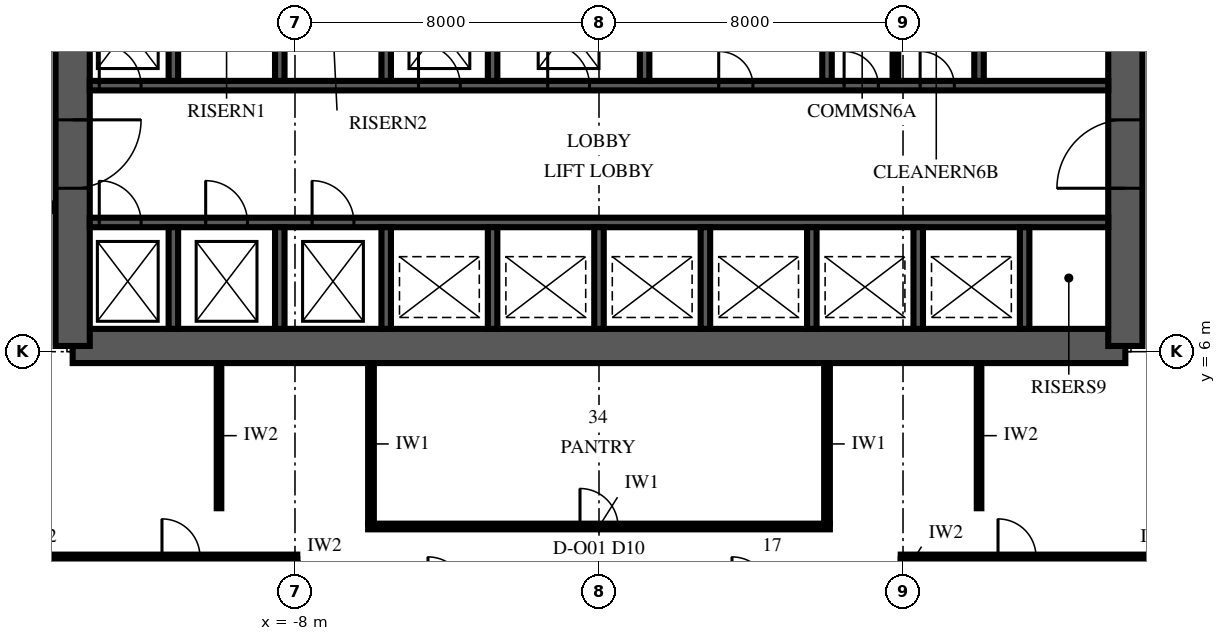
"""IFC4 building model, lengths in metres.
Left out: names, types, materials, properties, quantities, classifications, styles, units other than length and angle.
Written with IfcOpenShell. Run it as: python <this file> out.ifc"""

import sys

from ifc_helpers import new_model, si_unit, direction, frame, frame_2d, origin, place, context, subcontext, project, spatial, polyline, rectangle, outline, extrude, element, fill, save


model = new_model("IFC4")
c1 = context("Model", 3, precision=1e-05, world=origin(), true_north=direction((0.0, 1.0)))
c2 = subcontext(c1, "Body", "Model", "MODEL_VIEW")
j1 = project(units=[si_unit("LENGTHUNIT", "METRE"), si_unit("PLANEANGLEUNIT", "RADIAN")], contexts=[c1])
p1 = place(None, origin())
s1 = spatial("IfcSite", under=j1, at=p1, CompositionType="ELEMENT")
p2 = place(p1, origin())
s2 = spatial("IfcBuilding", under=s1, at=p2, CompositionType="ELEMENT")
p3 = place(p2, frame((0.0, 0.0, 72.0)))
s3 = spatial("IfcBuildingStorey", under=s2, at=p3, CompositionType="ELEMENT", Elevation=72.0)
p4 = place(p3, frame((-13.85, 6.15, 0.0), z_axis=(0.0, 0.0, 1.0), x_axis=(1.0, 0.0, 0.0)))
e1 = element("IfcWall", 1, at=p4, inside=s3, PredefinedType="SHEAR", context=c2, shape_type="SweptSolid", body=[
    extrude(rectangle(XDim=27.7, YDim=0.9, at=frame_2d((13.85, 0.0))), origin(), (0.0, 0.0, 1.0), 4.0),
])
p5 = place(p3, frame((13.85, 6.15, 0.0), z_axis=(0.0, 0.0, 1.0), x_axis=(0.0, 1.0, 0.0)))
e2 = element("IfcWall", 2, at=p5, inside=s3, PredefinedType="SHEAR", context=c2, shape_type="SweptSolid", body=[
    extrude(outline(polyline([(0.0, -0.45), (17.7, -0.45), (17.7, 0.0), (17.25, 0.0), (17.25, 0.45), (0.45, 0.45), (0.45, 0.0), (0.0, 0.0), (0.0, -0.45)])), origin(), (0.0, 0.0, 1.0), 4.0),
])
p6 = place(p5, frame((4.15, 0.0, 0.0)))
e3 = element("IfcOpeningElement", 3, at=p6, cuts=e2, PredefinedType="OPENING", context=c2, shape_type="SweptSolid", body=[
    extrude(rectangle(XDim=1.8, YDim=2.4, at=frame_2d((0.9, 1.2))), frame((0.0, 0.465, 0.0), z_axis=(0.0, -1.0, 0.0), x_axis=(1.0, 0.0, 0.0)), (0.0, 0.0, 1.0), 0.93),
])
p7 = place(p3, frame((-13.85, 23.85, 0.0), z_axis=(0.0, 0.0, 1.0), x_axis=(0.0, -1.0, 0.0)))
e4 = element("IfcWall", 4, at=p7, inside=s3, PredefinedType="SHEAR", context=c2, shape_type="SweptSolid", body=[
    extrude(outline(polyline([(0.0, -0.45), (17.7, -0.45), (17.7, 0.0), (17.25, 0.0), (17.25, 0.45), (0.45, 0.45), (0.45, 0.0), (0.0, 0.0), (0.0, -0.45)])), origin(), (0.0, 0.0, 1.0), 4.0),
])
p8 = place(p7, frame((11.75, 0.0, 0.0)))
e5 = element("IfcOpeningElement", 5, at=p8, cuts=e4, PredefinedType="OPENING", context=c2, shape_type="SweptSolid", body=[
    extrude(rectangle(XDim=1.8, YDim=2.4, at=frame_2d((0.9, 1.2))), frame((0.0, 0.465, 0.0), z_axis=(0.0, -1.0, 0.0), x_axis=(1.0, 0.0, 0.0)), (0.0, 0.0, 1.0), 0.93),
])
p9 = place(p3, frame((-13.4, 9.4, 0.0), z_axis=(0.0, 0.0, 1.0), x_axis=(1.0, 0.0, 0.0)))
e6 = element("IfcWall", 6, at=p9, inside=s3, PredefinedType="SHEAR", context=c2, shape_type="SweptSolid", body=[
    extrude(rectangle(XDim=26.8, YDim=0.25, at=frame_2d((13.4, 0.0))), origin(), (0.0, 0.0, 1.0), 4.0),
])
p10 = place(p9, frame((0.25, 0.0, 0.0)))
e7 = element("IfcOpeningElement", 7, at=p10, cuts=e6, PredefinedType="OPENING", context=c2, shape_type="SweptSolid", body=[
    extrude(rectangle(XDim=1.1, YDim=2.1, at=frame_2d((0.55, 1.05))), frame((0.0, 0.14, 0.0), z_axis=(0.0, -1.0, 0.0), x_axis=(1.0, 0.0, 0.0)), (0.0, 0.0, 1.0), 0.28),
])
p11 = place(p9, frame((3.05, 0.0, 0.0)))
e8 = element("IfcOpeningElement", 8, at=p11, cuts=e6, PredefinedType="OPENING", context=c2, shape_type="SweptSolid", body=[
    extrude(rectangle(XDim=1.1, YDim=2.1, at=frame_2d((0.55, 1.05))), frame((0.0, 0.14, 0.0), z_axis=(0.0, -1.0, 0.0), x_axis=(1.0, 0.0, 0.0)), (0.0, 0.0, 1.0), 0.28),
])
p12 = place(p9, frame((5.85, 0.0, 0.0)))
e9 = element("IfcOpeningElement", 9, at=p12, cuts=e6, PredefinedType="OPENING", context=c2, shape_type="SweptSolid", body=[
    extrude(rectangle(XDim=1.1, YDim=2.1, at=frame_2d((0.55, 1.05))), frame((0.0, 0.14, 0.0), z_axis=(0.0, -1.0, 0.0), x_axis=(1.0, 0.0, 0.0)), (0.0, 0.0, 1.0), 0.28),
])
p13 = place(p3, frame((-13.4, 13.0, 0.0), z_axis=(0.0, 0.0, 1.0), x_axis=(1.0, 0.0, 0.0)))
e10 = element("IfcWall", 10, at=p13, inside=s3, PredefinedType="SHEAR", context=c2, shape_type="SweptSolid", body=[
    extrude(rectangle(XDim=26.8, YDim=0.25, at=frame_2d((13.4, 0.0))), origin(), (0.0, 0.0, 1.0), 4.0),
])
p14 = place(p13, frame((0.25, 0.0, 0.0)))
e11 = element("IfcOpeningElement", 11, at=p14, cuts=e10, PredefinedType="OPENING", context=c2, shape_type="SweptSolid", body=[
    extrude(rectangle(XDim=1.1, YDim=2.1, at=frame_2d((0.55, 1.05))), frame((0.0, 0.14, 0.0), z_axis=(0.0, -1.0, 0.0), x_axis=(1.0, 0.0, 0.0)), (0.0, 0.0, 1.0), 0.28),
])
p15 = place(p13, frame((8.65, 0.0, 0.0)))
e12 = element("IfcOpeningElement", 12, at=p15, cuts=e10, PredefinedType="OPENING", context=c2, shape_type="SweptSolid", body=[
    extrude(rectangle(XDim=1.1, YDim=2.1, at=frame_2d((0.55, 1.05))), frame((0.0, 0.14, 0.0), z_axis=(0.0, -1.0, 0.0), x_axis=(1.0, 0.0, 0.0)), (0.0, 0.0, 1.0), 0.28),
])
p16 = place(p13, frame((12.05, 0.0, 0.0)))
e13 = element("IfcOpeningElement", 13, at=p16, cuts=e10, PredefinedType="OPENING", context=c2, shape_type="SweptSolid", body=[
    extrude(rectangle(XDim=1.1, YDim=2.1, at=frame_2d((0.55, 1.05))), frame((0.0, 0.14, 0.0), z_axis=(0.0, -1.0, 0.0), x_axis=(1.0, 0.0, 0.0)), (0.0, 0.0, 1.0), 0.28),
])
p17 = place(p13, frame((16.55, 0.0, 0.0)))
e14 = element("IfcOpeningElement", 14, at=p17, cuts=e10, PredefinedType="OPENING", context=c2, shape_type="SweptSolid", body=[
    extrude(rectangle(XDim=0.9, YDim=2.1, at=frame_2d((0.45, 1.05))), frame((0.0, 0.14, 0.0), z_axis=(0.0, -1.0, 0.0), x_axis=(1.0, 0.0, 0.0)), (0.0, 0.0, 1.0), 0.28),
])
p18 = place(p13, frame((19.85, 0.0, 0.0)))
e15 = element("IfcOpeningElement", 15, at=p18, cuts=e10, PredefinedType="OPENING", context=c2, shape_type="SweptSolid", body=[
    extrude(rectangle(XDim=0.9, YDim=2.1, at=frame_2d((0.45, 1.05))), frame((0.0, 0.14, 0.0), z_axis=(0.0, -1.0, 0.0), x_axis=(1.0, 0.0, 0.0)), (0.0, 0.0, 1.0), 0.28),
])
p19 = place(p13, frame((21.85, 0.0, 0.0)))
e16 = element("IfcOpeningElement", 16, at=p19, cuts=e10, PredefinedType="OPENING", context=c2, shape_type="SweptSolid", body=[
    extrude(rectangle(XDim=0.9, YDim=2.1, at=frame_2d((0.45, 1.05))), frame((0.0, 0.14, 0.0), z_axis=(0.0, -1.0, 0.0), x_axis=(1.0, 0.0, 0.0)), (0.0, 0.0, 1.0), 0.28),
])
for number, where, z_axis, x_axis in (
    (17, (-11.2, 6.6, 0.0), (0.0, 0.0, 1.0), (0.0, 1.0, 0.0)),
    (18, (-8.4, 6.6, 0.0), (0.0, 0.0, 1.0), (0.0, 1.0, 0.0)),
    (19, (-5.6, 6.6, 0.0), (0.0, 0.0, 1.0), (0.0, 1.0, 0.0)),
    (20, (-2.8, 6.6, 0.0), (0.0, 0.0, 1.0), (0.0, 1.0, 0.0)),
    (21, (0.0, 6.6, 0.0), (0.0, 0.0, 1.0), (0.0, 1.0, 0.0)),
    (22, (2.8, 6.6, 0.0), (0.0, 0.0, 1.0), (0.0, 1.0, 0.0)),
    (23, (5.6, 6.6, 0.0), (0.0, 0.0, 1.0), (0.0, 1.0, 0.0)),
    (24, (8.4, 6.6, 0.0), (0.0, 0.0, 1.0), (0.0, 1.0, 0.0)),
    (25, (11.2, 6.6, 0.0), (0.0, 0.0, 1.0), (0.0, 1.0, 0.0)),
):
    element("IfcWall", number, at=place(p3, frame(where, z_axis=z_axis, x_axis=x_axis)), inside=s3, PredefinedType="SHEAR", context=c2, shape_type="SweptSolid", body=[
        extrude(rectangle(XDim=2.675, YDim=0.25, at=frame_2d((1.337, 0.0))), origin(), (0.0, 0.0, 1.0), 4.0),
    ])
for number, where, z_axis, x_axis in (
    (26, (-11.2, 13.125, 0.0), (0.0, 0.0, 1.0), (0.0, 1.0, 0.0)),
    (27, (-8.4, 13.125, 0.0), (0.0, 0.0, 1.0), (0.0, 1.0, 0.0)),
    (28, (-5.6, 13.125, 0.0), (0.0, 0.0, 1.0), (0.0, 1.0, 0.0)),
    (29, (-2.8, 13.125, 0.0), (0.0, 0.0, 1.0), (0.0, 1.0, 0.0)),
    (30, (1.2, 13.125, 0.0), (0.0, 0.0, 1.0), (0.0, 1.0, 0.0)),
    (31, (6.0, 13.125, 0.0), (0.0, 0.0, 1.0), (0.0, 1.0, 0.0)),
    (32, (10.0, 13.125, 0.0), (0.0, 0.0, 1.0), (0.0, 1.0, 0.0)),
):
    element("IfcWall", number, at=place(p3, frame(where, z_axis=z_axis, x_axis=x_axis)), inside=s3, PredefinedType="SHEAR", context=c2, shape_type="SweptSolid", body=[
        extrude(rectangle(XDim=2.75, YDim=0.25, at=frame_2d((1.375, 0.0))), origin(), (0.0, 0.0, 1.0), 4.0),
    ])
p20 = place(p3, frame((7.8, 13.125, 0.0), z_axis=(0.0, 0.0, 1.0), x_axis=(0.0, 1.0, 0.0)))
e33 = element("IfcWall", 33, at=p20, inside=s3, PredefinedType="PARTITIONING", context=c2, shape_type="SweptSolid", body=[
    extrude(rectangle(XDim=2.75, YDim=0.15, at=frame_2d((1.375, 0.0))), origin(), (0.0, 0.0, 1.0), 3.85),
])
p21 = place(p3, frame((-22.06, 0.6, 0.0), z_axis=(0.0, 0.0, 1.0), x_axis=(1.0, 0.0, 0.0)))
e34 = element("IfcWall", 34, at=p21, inside=s3, PredefinedType="PARTITIONING", context=c2, shape_type="SweptSolid", body=[
    extrude(rectangle(XDim=14.12, YDim=0.12, at=frame_2d((7.06, 0.0))), origin(), (0.0, 0.0, 1.0), 3.25),
])
p22 = place(p21, frame((1.56, 0.0, 0.0)))
e35 = element("IfcOpeningElement", 35, at=p22, cuts=e34, PredefinedType="OPENING", context=c2, shape_type="SweptSolid", body=[
    extrude(rectangle(XDim=1.0, YDim=2.4, at=frame_2d((0.5, 1.2))), frame((0.0, 0.075, 0.0), z_axis=(0.0, -1.0, 0.0), x_axis=(1.0, 0.0, 0.0)), (0.0, 0.0, 1.0), 0.15),
])
p23 = place(p21, frame((5.56, 0.0, 0.0)))
e36 = element("IfcOpeningElement", 36, at=p23, cuts=e34, PredefinedType="OPENING", context=c2, shape_type="SweptSolid", body=[
    extrude(rectangle(XDim=1.0, YDim=2.4, at=frame_2d((0.5, 1.2))), frame((0.0, 0.075, 0.0), z_axis=(0.0, -1.0, 0.0), x_axis=(1.0, 0.0, 0.0)), (0.0, 0.0, 1.0), 0.15),
])
p24 = place(p21, frame((10.56, 0.0, 0.0)))
e37 = element("IfcOpeningElement", 37, at=p24, cuts=e34, PredefinedType="OPENING", context=c2, shape_type="SweptSolid", body=[
    extrude(rectangle(XDim=1.0, YDim=2.4, at=frame_2d((0.5, 1.2))), frame((0.0, 0.075, 0.0), z_axis=(0.0, -1.0, 0.0), x_axis=(1.0, 0.0, 0.0)), (0.0, 0.0, 1.0), 0.15),
])
p25 = place(p3, frame((7.94, 0.6, 0.0), z_axis=(0.0, 0.0, 1.0), x_axis=(1.0, 0.0, 0.0)))
e38 = element("IfcWall", 38, at=p25, inside=s3, PredefinedType="PARTITIONING", context=c2, shape_type="SweptSolid", body=[
    extrude(rectangle(XDim=14.12, YDim=0.12, at=frame_2d((7.06, 0.0))), origin(), (0.0, 0.0, 1.0), 3.25),
])
p26 = place(p25, frame((7.56, 0.0, 0.0)))
e39 = element("IfcOpeningElement", 39, at=p26, cuts=e38, PredefinedType="OPENING", context=c2, shape_type="SweptSolid", body=[
    extrude(rectangle(XDim=1.0, YDim=2.4, at=frame_2d((0.5, 1.2))), frame((0.0, 0.075, 0.0), z_axis=(0.0, -1.0, 0.0), x_axis=(1.0, 0.0, 0.0)), (0.0, 0.0, 1.0), 0.15),
])
p27 = place(p25, frame((11.56, 0.0, 0.0)))
e40 = element("IfcOpeningElement", 40, at=p27, cuts=e38, PredefinedType="OPENING", context=c2, shape_type="SweptSolid", body=[
    extrude(rectangle(XDim=1.0, YDim=2.4, at=frame_2d((0.5, 1.2))), frame((0.0, 0.075, 0.0), z_axis=(0.0, -1.0, 0.0), x_axis=(1.0, 0.0, 0.0)), (0.0, 0.0, 1.0), 0.15),
])
p28 = place(p25, frame((2.56, 0.0, 0.0)))
e41 = element("IfcOpeningElement", 41, at=p28, cuts=e38, PredefinedType="OPENING", context=c2, shape_type="SweptSolid", body=[
    extrude(rectangle(XDim=1.0, YDim=2.4, at=frame_2d((0.5, 1.2))), frame((0.0, 0.075, 0.0), z_axis=(0.0, -1.0, 0.0), x_axis=(1.0, 0.0, 0.0)), (0.0, 0.0, 1.0), 0.15),
])
p29 = place(p3, frame((-6.075, 1.4, 0.0), z_axis=(0.0, 0.0, 1.0), x_axis=(1.0, 0.0, 0.0)))
e42 = element("IfcWall", 42, at=p29, inside=s3, PredefinedType="PARTITIONING", context=c2, shape_type="SweptSolid", body=[
    extrude(rectangle(XDim=12.15, YDim=0.15, at=frame_2d((6.075, 0.0))), origin(), (0.0, 0.0, 1.0), 3.25),
])
p30 = place(p29, frame((5.575, 0.0, 0.0)))
e43 = element("IfcOpeningElement", 43, at=p30, cuts=e42, PredefinedType="OPENING", context=c2, shape_type="SweptSolid", body=[
    extrude(rectangle(XDim=1.0, YDim=2.3, at=frame_2d((0.5, 1.15))), frame((0.0, 0.09, 0.0), z_axis=(0.0, -1.0, 0.0), x_axis=(1.0, 0.0, 0.0)), (0.0, 0.0, 1.0), 0.18),
])
p31 = place(p3, frame((-16.35, 9.8, 0.0), z_axis=(0.0, 0.0, 1.0), x_axis=(1.0, 0.0, 0.0)))
e44 = element("IfcWall", 44, at=p31, inside=s3, PredefinedType="PARTITIONING", context=c2, shape_type="SweptSolid", body=[
    extrude(rectangle(XDim=2.02, YDim=0.2, at=frame_2d((1.01, 0.0))), origin(), (0.0, 0.0, 1.0), 3.85),
])
p32 = place(p3, frame((-14.0, -4.74, 0.0), z_axis=(0.0, 0.0, 1.0), x_axis=(0.0, 1.0, 0.0)))
e45 = element("IfcWall", 45, at=p32, inside=s3, PredefinedType="PARTITIONING", context=c2, shape_type="SweptSolid", body=[
    extrude(rectangle(XDim=5.28, YDim=0.175, at=frame_2d((2.64, 0.0))), origin(), (0.0, 0.0, 1.0), 3.25),
])
p33 = place(p3, frame((-8.0, -0.34, 0.0), z_axis=(0.0, 0.0, 1.0), x_axis=(0.0, 1.0, 0.0)))
e46 = element("IfcWall", 46, at=p33, inside=s3, PredefinedType="PARTITIONING", context=c2, shape_type="SweptSolid", body=[
    extrude(rectangle(XDim=0.88, YDim=0.12, at=frame_2d((0.44, 0.0))), origin(), (0.0, 0.0, 1.0), 3.85),
])
for number, where, z_axis, x_axis in (
    (47, (-6.0, 1.475, 0.0), (0.0, 0.0, 1.0), (0.0, 1.0, 0.0)),
    (48, (6.0, 1.475, 0.0), (0.0, 0.0, 1.0), (0.0, 1.0, 0.0)),
):
    element("IfcWall", number, at=place(p3, frame(where, z_axis=z_axis, x_axis=x_axis)), inside=s3, PredefinedType="PARTITIONING", context=c2, shape_type="SweptSolid", body=[
        extrude(rectangle(XDim=4.195, YDim=0.15, at=frame_2d((2.097, 0.0))), origin(), (0.0, 0.0, 1.0), 3.85),
    ])
p34 = place(p3, frame((8.0, -0.34, 0.0), z_axis=(0.0, 0.0, 1.0), x_axis=(0.0, 1.0, 0.0)))
e49 = element("IfcWall", 49, at=p34, inside=s3, PredefinedType="PARTITIONING", context=c2, shape_type="SweptSolid", body=[
    extrude(rectangle(XDim=0.88, YDim=0.12, at=frame_2d((0.44, 0.0))), origin(), (0.0, 0.0, 1.0), 3.85),
])
p35 = place(p3, frame((14.0, -4.74, 0.0), z_axis=(0.0, 0.0, 1.0), x_axis=(0.0, 1.0, 0.0)))
e50 = element("IfcWall", 50, at=p35, inside=s3, PredefinedType="PARTITIONING", context=c2, shape_type="SweptSolid", body=[
    extrude(rectangle(XDim=5.28, YDim=0.175, at=frame_2d((2.64, 0.0))), origin(), (0.0, 0.0, 1.0), 3.25),
])
for number, where, z_axis, x_axis in (
    (51, (-9.999, 1.88, 0.0), (0.0, 0.0, 1.0), (0.0, 1.0, 0.0)),
    (52, (10.001, 1.88, 0.0), (0.0, 0.0, 1.0), (0.0, 1.0, 0.0)),
):
    element("IfcWall", number, at=place(p3, frame(where, z_axis=z_axis, x_axis=x_axis)), inside=s3, PredefinedType="PARTITIONING", context=c2, shape_type="SweptSolid", body=[
        extrude(rectangle(XDim=3.82, YDim=0.12, at=frame_2d((1.91, 0.0))), origin(), (0.0, 0.0, 1.0), 3.85),
    ])
p36 = place(p6, origin())
e53 = element("IfcDoor", 53, at=p36, inside=s3, OperationType="DOUBLE_DOOR_SINGLE_SWING", PredefinedType="DOOR", context=c2, shape_type="SweptSolid", body=[
    extrude(rectangle(XDim=1.8, YDim=2.4, at=frame_2d((0.9, 1.2))), frame((0.0, 0.45, 0.0), z_axis=(0.0, -1.0, 0.0), x_axis=(1.0, 0.0, 0.0)), (0.0, 0.0, 1.0), 0.899),
])
fill(e3, e53)
p37 = place(p8, origin())
e54 = element("IfcDoor", 54, at=p37, inside=s3, OperationType="DOUBLE_DOOR_SINGLE_SWING", PredefinedType="DOOR", context=c2, shape_type="SweptSolid", body=[
    extrude(rectangle(XDim=1.8, YDim=2.4, at=frame_2d((0.9, 1.2))), frame((0.0, 0.45, 0.0), z_axis=(0.0, -1.0, 0.0), x_axis=(1.0, 0.0, 0.0)), (0.0, 0.0, 1.0), 0.899),
])
fill(e5, e54)
p38 = place(p10, origin())
e55 = element("IfcDoor", 55, at=p38, inside=s3, OperationType="SLIDING_TO_LEFT", PredefinedType="DOOR", context=c2, shape_type="SweptSolid", body=[
    extrude(rectangle(XDim=1.1, YDim=2.1, at=frame_2d((0.55, 1.05))), frame((0.0, 0.125, 0.0), z_axis=(0.0, -1.0, 0.0), x_axis=(1.0, 0.0, 0.0)), (0.0, 0.0, 1.0), 0.25),
])
fill(e7, e55)
p39 = place(p11, origin())
e56 = element("IfcDoor", 56, at=p39, inside=s3, OperationType="SLIDING_TO_LEFT", PredefinedType="DOOR", context=c2, shape_type="SweptSolid", body=[
    extrude(rectangle(XDim=1.1, YDim=2.1, at=frame_2d((0.55, 1.05))), frame((0.0, 0.125, 0.0), z_axis=(0.0, -1.0, 0.0), x_axis=(1.0, 0.0, 0.0)), (0.0, 0.0, 1.0), 0.25),
])
fill(e8, e56)
p40 = place(p12, origin())
e57 = element("IfcDoor", 57, at=p40, inside=s3, OperationType="SLIDING_TO_LEFT", PredefinedType="DOOR", context=c2, shape_type="SweptSolid", body=[
    extrude(rectangle(XDim=1.1, YDim=2.1, at=frame_2d((0.55, 1.05))), frame((0.0, 0.125, 0.0), z_axis=(0.0, -1.0, 0.0), x_axis=(1.0, 0.0, 0.0)), (0.0, 0.0, 1.0), 0.25),
])
fill(e9, e57)
p41 = place(p14, origin())
e58 = element("IfcDoor", 58, at=p41, inside=s3, OperationType="SLIDING_TO_LEFT", PredefinedType="DOOR", context=c2, shape_type="SweptSolid", body=[
    extrude(rectangle(XDim=1.1, YDim=2.1, at=frame_2d((0.55, 1.05))), frame((0.0, 0.125, 0.0), z_axis=(0.0, -1.0, 0.0), x_axis=(1.0, 0.0, 0.0)), (0.0, 0.0, 1.0), 0.25),
])
fill(e11, e58)
p42 = place(p15, origin())
e59 = element("IfcDoor", 59, at=p42, inside=s3, OperationType="SLIDING_TO_LEFT", PredefinedType="DOOR", context=c2, shape_type="SweptSolid", body=[
    extrude(rectangle(XDim=1.1, YDim=2.1, at=frame_2d((0.55, 1.05))), frame((0.0, 0.125, 0.0), z_axis=(0.0, -1.0, 0.0), x_axis=(1.0, 0.0, 0.0)), (0.0, 0.0, 1.0), 0.25),
])
fill(e12, e59)
p43 = place(p16, origin())
e60 = element("IfcDoor", 60, at=p43, inside=s3, OperationType="SLIDING_TO_LEFT", PredefinedType="DOOR", context=c2, shape_type="SweptSolid", body=[
    extrude(rectangle(XDim=1.1, YDim=2.1, at=frame_2d((0.55, 1.05))), frame((0.0, 0.125, 0.0), z_axis=(0.0, -1.0, 0.0), x_axis=(1.0, 0.0, 0.0)), (0.0, 0.0, 1.0), 0.25),
])
fill(e13, e60)
p44 = place(p17, origin())
e61 = element("IfcDoor", 61, at=p44, inside=s3, OperationType="SINGLE_SWING_LEFT", PredefinedType="DOOR", context=c2, shape_type="SweptSolid", body=[
    extrude(rectangle(XDim=0.9, YDim=2.1, at=frame_2d((0.45, 1.05))), frame((0.0, 0.125, 0.0), z_axis=(0.0, -1.0, 0.0), x_axis=(1.0, 0.0, 0.0)), (0.0, 0.0, 1.0), 0.25),
])
fill(e14, e61)
p45 = place(p18, origin())
e62 = element("IfcDoor", 62, at=p45, inside=s3, OperationType="SINGLE_SWING_LEFT", PredefinedType="DOOR", context=c2, shape_type="SweptSolid", body=[
    extrude(rectangle(XDim=0.9, YDim=2.1, at=frame_2d((0.45, 1.05))), frame((0.0, 0.125, 0.0), z_axis=(0.0, -1.0, 0.0), x_axis=(1.0, 0.0, 0.0)), (0.0, 0.0, 1.0), 0.25),
])
fill(e15, e62)
p46 = place(p19, origin())
e63 = element("IfcDoor", 63, at=p46, inside=s3, OperationType="SINGLE_SWING_LEFT", PredefinedType="DOOR", context=c2, shape_type="SweptSolid", body=[
    extrude(rectangle(XDim=0.9, YDim=2.1, at=frame_2d((0.45, 1.05))), frame((0.0, 0.125, 0.0), z_axis=(0.0, -1.0, 0.0), x_axis=(1.0, 0.0, 0.0)), (0.0, 0.0, 1.0), 0.25),
])
fill(e16, e63)
p47 = place(p30, origin())
e64 = element("IfcDoor", 64, at=p47, inside=s3, OperationType="SINGLE_SWING_LEFT", PredefinedType="DOOR", context=c2, shape_type="SweptSolid", body=[
    extrude(rectangle(XDim=1.0, YDim=2.3, at=frame_2d((0.5, 1.15))), frame((0.0, 0.075, 0.0), z_axis=(0.0, -1.0, 0.0), x_axis=(1.0, 0.0, 0.0)), (0.0, 0.0, 1.0), 0.149),
])
fill(e43, e64)
p48 = place(p24, origin())
e65 = element("IfcDoor", 65, at=p48, inside=s3, OperationType="SINGLE_SWING_RIGHT", PredefinedType="DOOR", context=c2, shape_type="SweptSolid", body=[
    extrude(rectangle(XDim=1.0, YDim=2.4, at=frame_2d((0.5, 1.2))), frame((0.0, 0.06, 0.0), z_axis=(0.0, -1.0, 0.0), x_axis=(1.0, 0.0, 0.0)), (0.0, 0.0, 1.0), 0.12),
])
fill(e37, e65)
p49 = place(p28, origin())
e66 = element("IfcDoor", 66, at=p49, inside=s3, OperationType="SINGLE_SWING_RIGHT", PredefinedType="DOOR", context=c2, shape_type="SweptSolid", body=[
    extrude(rectangle(XDim=1.0, YDim=2.4, at=frame_2d((0.5, 1.2))), frame((0.0, 0.06, 0.0), z_axis=(0.0, -1.0, 0.0), x_axis=(1.0, 0.0, 0.0)), (0.0, 0.0, 1.0), 0.12),
])
fill(e41, e66)
save(model, sys.argv[1])
